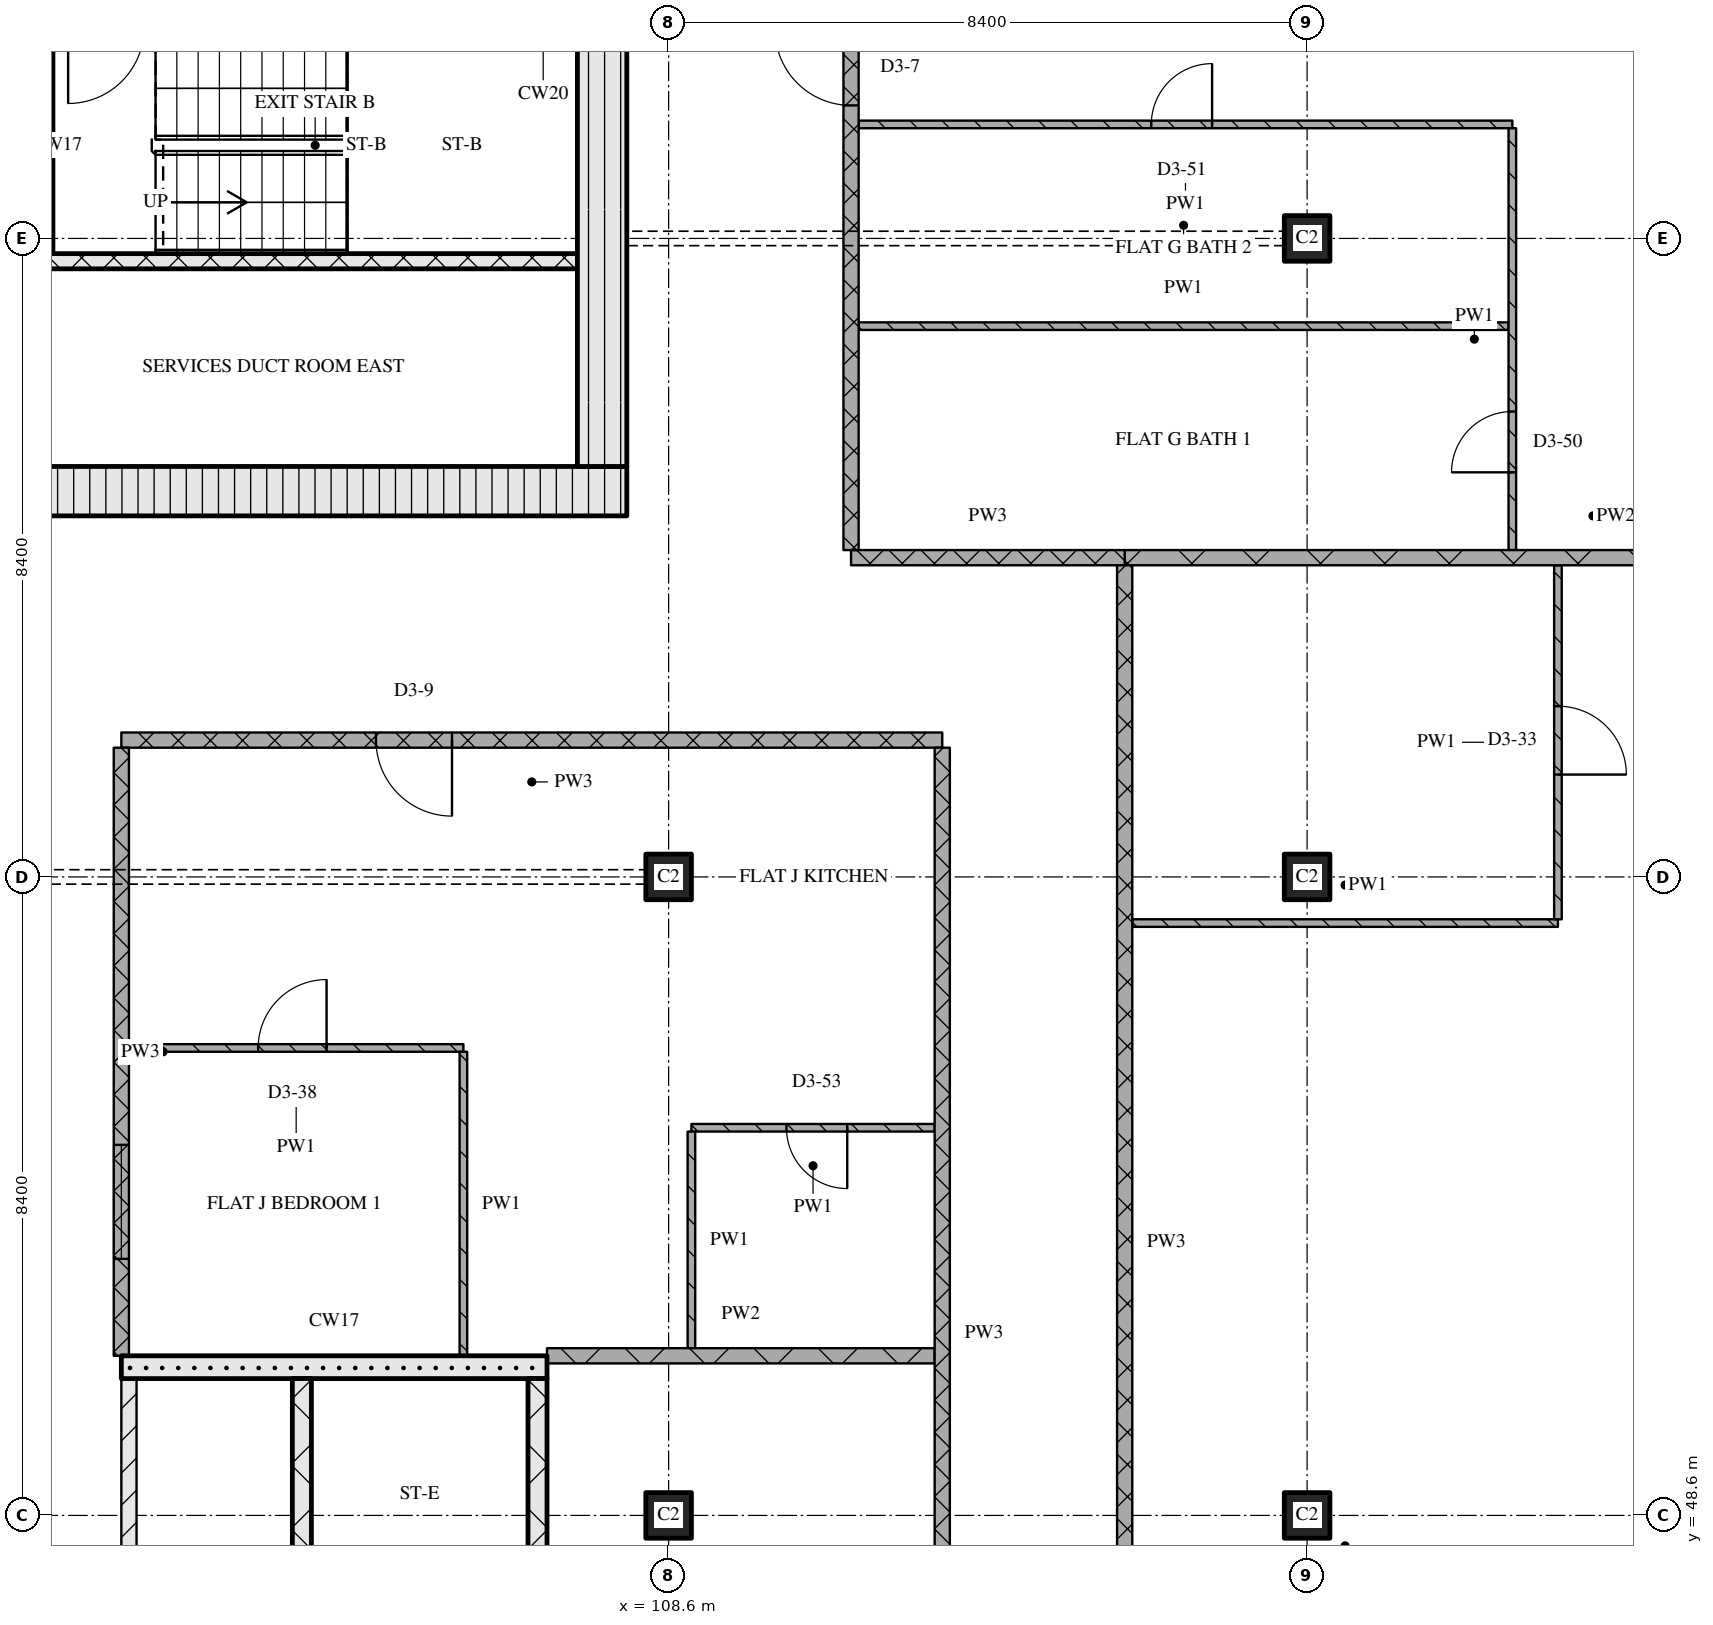
"""IFC4 building model, lengths in metres.
Left out: names, types, materials, properties, quantities, classifications, styles, units other than length and angle.
Written with IfcOpenShell. Run it as: python <this file> out.ifc"""

import sys

from ifc_helpers import new_model, si_unit, direction, frame, frame_2d, origin, origin_2d, place, context, subcontext, project, spatial, rectangle, extrude, element, fill, save


model = new_model("IFC4")
c1 = context("Model", 3, precision=1e-05, world=origin(), true_north=direction((0.0, 1.0)))
c2 = subcontext(c1, "Body", "Model", "MODEL_VIEW")
j1 = project(units=[si_unit("LENGTHUNIT", "METRE"), si_unit("PLANEANGLEUNIT", "RADIAN")], contexts=[c1])
p1 = place(None, origin())
s1 = spatial("IfcSite", under=j1, at=p1, CompositionType="ELEMENT")
p2 = place(p1, origin())
s2 = spatial("IfcBuilding", under=s1, at=p2, CompositionType="ELEMENT")
p3 = place(p2, frame((0.0, 0.0, 234.3)))
s3 = spatial("IfcBuildingStorey", under=s2, at=p3, CompositionType="ELEMENT", Elevation=234.3)
for number, where, z_axis, x_axis in (
    (1, (108.6, 48.6, 0.0), (0.0, 0.0, 1.0), (1.0, 0.0, 0.0)),
    (2, (108.6, 57.0, 0.0), (0.0, 0.0, 1.0), (1.0, 0.0, 0.0)),
    (3, (117.0, 48.6, 0.0), (0.0, 0.0, 1.0), (1.0, 0.0, 0.0)),
    (4, (117.0, 57.0, 0.0), (0.0, 0.0, 1.0), (1.0, 0.0, 0.0)),
    (5, (117.0, 65.4, 0.0), (0.0, 0.0, 1.0), (1.0, 0.0, 0.0)),
):
    element("IfcColumn", number, at=place(p3, frame(where, z_axis=z_axis, x_axis=x_axis)), inside=s3, PredefinedType="COLUMN", context=c2, shape_type="SweptSolid", body=[
        extrude(rectangle(XDim=0.6, YDim=0.6, at=origin_2d()), origin(), (0.0, 0.0, 1.0), 3.6),
    ])
p4 = place(p3, frame((67.15, 62.075, 0.0), z_axis=(0.0, 0.0, 1.0), x_axis=(1.0, 0.0, 0.0)))
e6 = element("IfcWall", 6, at=p4, inside=s3, PredefinedType="SOLIDWALL", context=c2, shape_type="SweptSolid", body=[
    extrude(rectangle(XDim=40.9, YDim=0.65, at=frame_2d((20.45, 0.0))), origin(), (0.0, 0.0, 1.0), 3.32),
])
p5 = place(p4, frame((20.8, 0.0, 0.0)))
e7 = element("IfcOpeningElement", 7, at=p5, cuts=e6, PredefinedType="OPENING", context=c2, shape_type="SweptSolid", body=[
    extrude(rectangle(XDim=1.8, YDim=2.1, at=frame_2d((0.9, 1.05))), frame((0.0, 0.335, 0.0), z_axis=(0.0, -1.0, 0.0), x_axis=(1.0, 0.0, 0.0)), (0.0, 0.0, 1.0), 0.67),
])
p6 = place(p3, frame((107.725, 62.4, 0.0), z_axis=(0.0, 0.0, 1.0), x_axis=(0.0, 1.0, 0.0)))
e8 = element("IfcWall", 8, at=p6, inside=s3, PredefinedType="SOLIDWALL", context=c2, shape_type="SweptSolid", body=[
    extrude(rectangle(XDim=12.0, YDim=0.65, at=frame_2d((6.0, 0.0))), origin(), (0.0, 0.0, 1.0), 3.32),
])
p7 = place(p6, frame((6.45, 0.0, 0.0)))
e9 = element("IfcOpeningElement", 9, at=p7, cuts=e8, PredefinedType="OPENING", context=c2, shape_type="SweptSolid", body=[
    extrude(rectangle(XDim=1.2, YDim=2.1, at=frame_2d((0.6, 1.05))), frame((0.0, 0.335, 0.0), z_axis=(0.0, -1.0, 0.0), x_axis=(1.0, 0.0, 0.0)), (0.0, 0.0, 1.0), 0.67),
])
p8 = place(p3, frame((91.4, 65.1, 0.0), z_axis=(0.0, 0.0, 1.0), x_axis=(1.0, 0.0, 0.0)))
e10 = element("IfcWall", 10, at=p8, inside=s3, PredefinedType="SOLIDWALL", context=c2, shape_type="SweptSolid", body=[
    extrude(rectangle(XDim=16.0, YDim=0.2, at=frame_2d((8.0, 0.0))), origin(), (0.0, 0.0, 1.0), 3.32),
])
p9 = place(p8, frame((0.85, 0.0, 0.0)))
e11 = element("IfcOpeningElement", 11, at=p9, cuts=e10, PredefinedType="OPENING", context=c2, shape_type="SweptSolid", body=[
    extrude(rectangle(XDim=1.1, YDim=2.1, at=frame_2d((0.55, 1.05))), frame((0.0, 0.11, 0.0), z_axis=(0.0, -1.0, 0.0), x_axis=(1.0, 0.0, 0.0)), (0.0, 0.0, 1.0), 0.22),
])
p10 = place(p8, frame((3.35, 0.0, 0.0)))
e12 = element("IfcOpeningElement", 12, at=p10, cuts=e10, PredefinedType="OPENING", context=c2, shape_type="SweptSolid", body=[
    extrude(rectangle(XDim=1.1, YDim=2.1, at=frame_2d((0.55, 1.05))), frame((0.0, 0.11, 0.0), z_axis=(0.0, -1.0, 0.0), x_axis=(1.0, 0.0, 0.0)), (0.0, 0.0, 1.0), 0.22),
])
p11 = place(p8, frame((5.85, 0.0, 0.0)))
e13 = element("IfcOpeningElement", 13, at=p11, cuts=e10, PredefinedType="OPENING", context=c2, shape_type="SweptSolid", body=[
    extrude(rectangle(XDim=1.1, YDim=2.1, at=frame_2d((0.55, 1.05))), frame((0.0, 0.11, 0.0), z_axis=(0.0, -1.0, 0.0), x_axis=(1.0, 0.0, 0.0)), (0.0, 0.0, 1.0), 0.22),
])
p12 = place(p8, frame((7.83, 0.0, 0.0)))
e14 = element("IfcOpeningElement", 14, at=p12, cuts=e10, PredefinedType="OPENING", context=c2, shape_type="SweptSolid", body=[
    extrude(rectangle(XDim=0.9, YDim=2.1, at=frame_2d((0.45, 1.05))), frame((0.0, 0.11, 0.0), z_axis=(0.0, -1.0, 0.0), x_axis=(1.0, 0.0, 0.0)), (0.0, 0.0, 1.0), 0.22),
])
p13 = place(p3, frame((100.35, 65.2, 0.0), z_axis=(0.0, 0.0, 1.0), x_axis=(0.0, 1.0, 0.0)))
e15 = element("IfcWall", 15, at=p13, inside=s3, PredefinedType="SOLIDWALL", context=c2, shape_type="SweptSolid", body=[
    extrude(rectangle(XDim=2.85, YDim=0.3, at=frame_2d((1.425, 0.0))), origin(), (0.0, 0.0, 1.0), 3.32),
])
p14 = place(p3, frame((101.5, 43.5, 0.0), z_axis=(0.0, 0.0, 1.0), x_axis=(0.0, 1.0, 0.0)))
e16 = element("IfcWall", 16, at=p14, inside=s3, PredefinedType="PARTITIONING", context=c2, shape_type="SweptSolid", body=[
    extrude(rectangle(XDim=6.9, YDim=0.2, at=frame_2d((3.45, 0.0))), origin(), (0.0, 0.0, 1.0), 3.32),
])
p15 = place(p14, frame((1.0, 0.0, 0.0)))
e17 = element("IfcOpeningElement", 17, at=p15, cuts=e16, PredefinedType="OPENING", context=c2, shape_type="SweptSolid", body=[
    extrude(rectangle(XDim=1.0, YDim=2.1, at=frame_2d((0.5, 1.05))), frame((0.0, 0.11, 0.0), z_axis=(0.0, -1.0, 0.0), x_axis=(1.0, 0.0, 0.0)), (0.0, 0.0, 1.0), 0.22),
])
p16 = place(p3, frame((103.775, 43.5, 0.0), z_axis=(0.0, 0.0, 1.0), x_axis=(0.0, 1.0, 0.0)))
e18 = element("IfcWall", 18, at=p16, inside=s3, PredefinedType="SOLIDWALL", context=c2, shape_type="SweptSolid", body=[
    extrude(rectangle(XDim=6.9, YDim=0.25, at=frame_2d((3.45, 0.0))), origin(), (0.0, 0.0, 1.0), 3.32),
])
p17 = place(p16, frame((0.2, 0.0, 0.0)))
e19 = element("IfcOpeningElement", 19, at=p17, cuts=e18, PredefinedType="OPENING", context=c2, shape_type="SweptSolid", body=[
    extrude(rectangle(XDim=1.0, YDim=2.1, at=frame_2d((0.5, 1.05))), frame((0.0, 0.135, 0.0), z_axis=(0.0, -1.0, 0.0), x_axis=(1.0, 0.0, 0.0)), (0.0, 0.0, 1.0), 0.27),
])
p18 = place(p3, frame((106.875, 43.5, 0.0), z_axis=(0.0, 0.0, 1.0), x_axis=(0.0, 1.0, 0.0)))
e20 = element("IfcWall", 20, at=p18, inside=s3, PredefinedType="SOLIDWALL", context=c2, shape_type="SweptSolid", body=[
    extrude(rectangle(XDim=6.9, YDim=0.25, at=frame_2d((3.45, 0.0))), origin(), (0.0, 0.0, 1.0), 3.32),
])
p19 = place(p3, frame((101.4, 50.55, 0.0), z_axis=(0.0, 0.0, 1.0), x_axis=(1.0, 0.0, 0.0)))
e21 = element("IfcWall", 21, at=p19, inside=s3, PredefinedType="SOLIDWALL", context=c2, shape_type="SweptSolid", body=[
    extrude(rectangle(XDim=5.6, YDim=0.3, at=frame_2d((2.8, 0.0))), origin(), (0.0, 0.0, 1.0), 3.32),
])
p20 = place(p3, frame((107.0, 50.7, 0.0), z_axis=(0.0, 0.0, 1.0), x_axis=(1.0, 0.0, 0.0)))
e22 = element("IfcWall", 22, at=p20, inside=s3, PredefinedType="PARTITIONING", context=c2, shape_type="SweptSolid", body=[
    extrude(rectangle(XDim=5.1, YDim=0.2, at=frame_2d((2.55, 0.0))), origin(), (0.0, 0.0, 1.0), 3.32),
])
p21 = place(p3, frame((112.1, 53.7, 0.0), z_axis=(0.0, 0.0, 1.0), x_axis=(-1.0, 0.0, 0.0)))
e23 = element("IfcWall", 23, at=p21, inside=s3, PredefinedType="PARTITIONING", context=c2, shape_type="SweptSolid", body=[
    extrude(rectangle(XDim=3.2, YDim=0.1, at=frame_2d((1.6, 0.0))), origin(), (0.0, 0.0, 1.0), 3.32),
])
p22 = place(p21, frame((1.15, 0.0, 0.0)))
e24 = element("IfcOpeningElement", 24, at=p22, cuts=e23, PredefinedType="OPENING", context=c2, shape_type="SweptSolid", body=[
    extrude(rectangle(XDim=0.8, YDim=2.1, at=frame_2d((0.4, 1.05))), frame((0.0, 0.06, 0.0), z_axis=(0.0, -1.0, 0.0), x_axis=(1.0, 0.0, 0.0)), (0.0, 0.0, 1.0), 0.12),
])
p23 = place(p3, frame((105.9, 54.75, 0.0), z_axis=(0.0, 0.0, 1.0), x_axis=(-1.0, 0.0, 0.0)))
e25 = element("IfcWall", 25, at=p23, inside=s3, PredefinedType="PARTITIONING", context=c2, shape_type="SweptSolid", body=[
    extrude(rectangle(XDim=4.4, YDim=0.1, at=frame_2d((2.2, 0.0))), origin(), (0.0, 0.0, 1.0), 3.32),
])
p24 = place(p23, frame((1.8, 0.0, 0.0)))
e26 = element("IfcOpeningElement", 26, at=p24, cuts=e25, PredefinedType="OPENING", context=c2, shape_type="SweptSolid", body=[
    extrude(rectangle(XDim=0.9, YDim=2.1, at=frame_2d((0.45, 1.05))), frame((0.0, 0.06, 0.0), z_axis=(0.0, -1.0, 0.0), x_axis=(1.0, 0.0, 0.0)), (0.0, 0.0, 1.0), 0.12),
])
p25 = place(p3, frame((114.7, 56.393, 0.0), z_axis=(0.0, 0.0, 1.0), x_axis=(1.0, 0.0, 0.0)))
e27 = element("IfcWall", 27, at=p25, inside=s3, PredefinedType="PARTITIONING", context=c2, shape_type="SweptSolid", body=[
    extrude(rectangle(XDim=5.6, YDim=0.1, at=frame_2d((2.8, 0.0))), origin(), (0.0, 0.0, 1.0), 3.32),
])
p26 = place(p3, frame((112.2, 58.8, 0.0), z_axis=(0.0, 0.0, 1.0), x_axis=(-1.0, 0.0, 0.0)))
e28 = element("IfcWall", 28, at=p26, inside=s3, PredefinedType="PARTITIONING", context=c2, shape_type="SweptSolid", body=[
    extrude(rectangle(XDim=10.8, YDim=0.2, at=frame_2d((5.4, 0.0))), origin(), (0.0, 0.0, 1.0), 3.32),
])
p27 = place(p26, frame((6.45, 0.0, 0.0)))
e29 = element("IfcOpeningElement", 29, at=p27, cuts=e28, PredefinedType="OPENING", context=c2, shape_type="SweptSolid", body=[
    extrude(rectangle(XDim=1.0, YDim=2.1, at=frame_2d((0.5, 1.05))), frame((0.0, 0.11, 0.0), z_axis=(0.0, -1.0, 0.0), x_axis=(1.0, 0.0, 0.0)), (0.0, 0.0, 1.0), 0.22),
])
p28 = place(p3, frame((111.0, 61.2, 0.0), z_axis=(0.0, 0.0, 1.0), x_axis=(1.0, 0.0, 0.0)))
e30 = element("IfcWall", 30, at=p28, inside=s3, PredefinedType="PARTITIONING", context=c2, shape_type="SweptSolid", body=[
    extrude(rectangle(XDim=3.6, YDim=0.2, at=frame_2d((1.8, 0.0))), origin(), (0.0, 0.0, 1.0), 3.32),
])
p29 = place(p3, frame((114.6, 61.2, 0.0), z_axis=(0.0, 0.0, 1.0), x_axis=(1.0, 0.0, 0.0)))
e31 = element("IfcWall", 31, at=p29, inside=s3, PredefinedType="PARTITIONING", context=c2, shape_type="SweptSolid", body=[
    extrude(rectangle(XDim=12.32, YDim=0.2, at=frame_2d((6.16, 0.0))), origin(), (0.0, 0.0, 1.0), 3.32),
])
p30 = place(p3, frame((111.1, 64.246, 0.0), z_axis=(0.0, 0.0, 1.0), x_axis=(1.0, 0.0, 0.0)))
e32 = element("IfcWall", 32, at=p30, inside=s3, PredefinedType="PARTITIONING", context=c2, shape_type="SweptSolid", body=[
    extrude(rectangle(XDim=8.55, YDim=0.1, at=frame_2d((4.275, 0.0))), origin(), (0.0, 0.0, 1.0), 3.32),
])
p31 = place(p3, frame((119.7, 66.9, 0.0), z_axis=(0.0, 0.0, 1.0), x_axis=(-1.0, 0.0, 0.0)))
e33 = element("IfcWall", 33, at=p31, inside=s3, PredefinedType="PARTITIONING", context=c2, shape_type="SweptSolid", body=[
    extrude(rectangle(XDim=8.6, YDim=0.1, at=frame_2d((4.3, 0.0))), origin(), (0.0, 0.0, 1.0), 3.32),
])
p32 = place(p31, frame((3.95, 0.0, 0.0)))
e34 = element("IfcOpeningElement", 34, at=p32, cuts=e33, PredefinedType="OPENING", context=c2, shape_type="SweptSolid", body=[
    extrude(rectangle(XDim=0.8, YDim=2.1, at=frame_2d((0.4, 1.05))), frame((0.0, 0.06, 0.0), z_axis=(0.0, -1.0, 0.0), x_axis=(1.0, 0.0, 0.0)), (0.0, 0.0, 1.0), 0.12),
])
p33 = place(p3, frame((101.4, 58.7, 0.0), z_axis=(0.0, 0.0, 1.0), x_axis=(0.0, -1.0, 0.0)))
e35 = element("IfcWall", 35, at=p33, inside=s3, PredefinedType="PARTITIONING", context=c2, shape_type="SweptSolid", body=[
    extrude(rectangle(XDim=8.0, YDim=0.2, at=frame_2d((4.0, 0.0))), origin(), (0.0, 0.0, 1.0), 3.32),
])
p34 = place(p33, frame((5.225, 0.0, 0.9)))
e36 = element("IfcOpeningElement", 36, at=p34, cuts=e35, PredefinedType="OPENING", context=c2, shape_type="SweptSolid", body=[
    extrude(rectangle(XDim=1.5, YDim=1.5, at=frame_2d((0.75, 0.75))), frame((0.0, 0.11, 0.0), z_axis=(0.0, -1.0, 0.0), x_axis=(1.0, 0.0, 0.0)), (0.0, 0.0, 1.0), 0.22),
])
p35 = place(p3, frame((105.9, 54.7, 0.0), z_axis=(0.0, 0.0, 1.0), x_axis=(0.0, -1.0, 0.0)))
e37 = element("IfcWall", 37, at=p35, inside=s3, PredefinedType="PARTITIONING", context=c2, shape_type="SweptSolid", body=[
    extrude(rectangle(XDim=4.0, YDim=0.1, at=frame_2d((2.0, 0.0))), origin(), (0.0, 0.0, 1.0), 3.32),
])
p36 = place(p3, frame((108.9, 53.65, 0.0), z_axis=(0.0, 0.0, 1.0), x_axis=(0.0, -1.0, 0.0)))
e38 = element("IfcWall", 38, at=p36, inside=s3, PredefinedType="PARTITIONING", context=c2, shape_type="SweptSolid", body=[
    extrude(rectangle(XDim=2.85, YDim=0.1, at=frame_2d((1.425, 0.0))), origin(), (0.0, 0.0, 1.0), 3.32),
])
p37 = place(p3, frame((111.0, 75.32, 0.0), z_axis=(0.0, 0.0, 1.0), x_axis=(0.0, -1.0, 0.0)))
e39 = element("IfcWall", 39, at=p37, inside=s3, PredefinedType="PARTITIONING", context=c2, shape_type="SweptSolid", body=[
    extrude(rectangle(XDim=14.02, YDim=0.2, at=frame_2d((7.01, 0.0))), origin(), (0.0, 0.0, 1.0), 3.32),
])
p38 = place(p37, frame((7.17, 0.0, 0.0)))
e40 = element("IfcOpeningElement", 40, at=p38, cuts=e39, PredefinedType="OPENING", context=c2, shape_type="SweptSolid", body=[
    extrude(rectangle(XDim=1.0, YDim=2.1, at=frame_2d((0.5, 1.05))), frame((0.0, 0.11, 0.0), z_axis=(0.0, -1.0, 0.0), x_axis=(1.0, 0.0, 0.0)), (0.0, 0.0, 1.0), 0.22),
])
p39 = place(p3, frame((112.2, 58.7, 0.0), z_axis=(0.0, 0.0, 1.0), x_axis=(0.0, -1.0, 0.0)))
e41 = element("IfcWall", 41, at=p39, inside=s3, PredefinedType="PARTITIONING", context=c2, shape_type="SweptSolid", body=[
    extrude(rectangle(XDim=15.4, YDim=0.2, at=frame_2d((7.7, 0.0))), origin(), (0.0, 0.0, 1.0), 3.32),
])
p40 = place(p3, frame((114.6, 61.1, 0.0), z_axis=(0.0, 0.0, 1.0), x_axis=(0.0, -1.0, 0.0)))
e42 = element("IfcWall", 42, at=p40, inside=s3, PredefinedType="PARTITIONING", context=c2, shape_type="SweptSolid", body=[
    extrude(rectangle(XDim=17.8, YDim=0.2, at=frame_2d((8.9, 0.0))), origin(), (0.0, 0.0, 1.0), 3.32),
])
p41 = place(p3, frame((119.7, 61.3, 0.0), z_axis=(0.0, 0.0, 1.0), x_axis=(0.0, 1.0, 0.0)))
e43 = element("IfcWall", 43, at=p41, inside=s3, PredefinedType="PARTITIONING", context=c2, shape_type="SweptSolid", body=[
    extrude(rectangle(XDim=5.55, YDim=0.1, at=frame_2d((2.775, 0.0))), origin(), (0.0, 0.0, 1.0), 3.32),
])
p42 = place(p41, frame((1.023, 0.0, 0.0)))
e44 = element("IfcOpeningElement", 44, at=p42, cuts=e43, PredefinedType="OPENING", context=c2, shape_type="SweptSolid", body=[
    extrude(rectangle(XDim=0.8, YDim=2.1, at=frame_2d((0.4, 1.05))), frame((0.0, 0.06, 0.0), z_axis=(0.0, -1.0, 0.0), x_axis=(1.0, 0.0, 0.0)), (0.0, 0.0, 1.0), 0.12),
])
p43 = place(p3, frame((120.3, 56.443, 0.0), z_axis=(0.0, 0.0, 1.0), x_axis=(0.0, 1.0, 0.0)))
e45 = element("IfcWall", 45, at=p43, inside=s3, PredefinedType="PARTITIONING", context=c2, shape_type="SweptSolid", body=[
    extrude(rectangle(XDim=4.657, YDim=0.1, at=frame_2d((2.329, 0.0))), origin(), (0.0, 0.0, 1.0), 3.32),
])
p44 = place(p43, frame((1.904, 0.0, 0.0)))
e46 = element("IfcOpeningElement", 46, at=p44, cuts=e45, PredefinedType="OPENING", context=c2, shape_type="SweptSolid", body=[
    extrude(rectangle(XDim=0.9, YDim=2.1, at=frame_2d((0.45, 1.05))), frame((0.0, 0.06, 0.0), z_axis=(0.0, -1.0, 0.0), x_axis=(1.0, 0.0, 0.0)), (0.0, 0.0, 1.0), 0.12),
])
p45 = place(p22, origin())
e47 = element("IfcDoor", 47, at=p45, inside=s3, OperationType="SINGLE_SWING_LEFT", PredefinedType="DOOR", context=c2, shape_type="SweptSolid", body=[
    extrude(rectangle(XDim=0.8, YDim=2.1, at=frame_2d((0.4, 1.05))), frame((0.0, 0.025, 0.0), z_axis=(0.0, -1.0, 0.0), x_axis=(1.0, 0.0, 0.0)), (0.0, 0.0, 1.0), 0.05),
])
fill(e24, e47)
p46 = place(p24, origin())
e48 = element("IfcDoor", 48, at=p46, inside=s3, OperationType="SINGLE_SWING_RIGHT", PredefinedType="DOOR", context=c2, shape_type="SweptSolid", body=[
    extrude(rectangle(XDim=0.9, YDim=2.1, at=frame_2d((0.45, 1.05))), frame((0.0, 0.025, 0.0), z_axis=(0.0, -1.0, 0.0), x_axis=(1.0, 0.0, 0.0)), (0.0, 0.0, 1.0), 0.05),
])
fill(e26, e48)
p47 = place(p27, origin())
e49 = element("IfcDoor", 49, at=p47, inside=s3, OperationType="SINGLE_SWING_LEFT", PredefinedType="DOOR", context=c2, shape_type="SweptSolid", body=[
    extrude(rectangle(XDim=1.0, YDim=2.1, at=frame_2d((0.5, 1.05))), frame((0.0, 0.025, 0.0), z_axis=(0.0, -1.0, 0.0), x_axis=(1.0, 0.0, 0.0)), (0.0, 0.0, 1.0), 0.05),
])
fill(e29, e49)
p48 = place(p32, origin())
e50 = element("IfcDoor", 50, at=p48, inside=s3, OperationType="SINGLE_SWING_RIGHT", PredefinedType="DOOR", context=c2, shape_type="SweptSolid", body=[
    extrude(rectangle(XDim=0.8, YDim=2.1, at=frame_2d((0.4, 1.05))), frame((0.0, 0.025, 0.0), z_axis=(0.0, -1.0, 0.0), x_axis=(1.0, 0.0, 0.0)), (0.0, 0.0, 1.0), 0.05),
])
fill(e34, e50)
p49 = place(p38, origin())
e51 = element("IfcDoor", 51, at=p49, inside=s3, OperationType="SINGLE_SWING_RIGHT", PredefinedType="DOOR", context=c2, shape_type="SweptSolid", body=[
    extrude(rectangle(XDim=1.0, YDim=2.1, at=frame_2d((0.5, 1.05))), frame((0.0, 0.025, 0.0), z_axis=(0.0, -1.0, 0.0), x_axis=(1.0, 0.0, 0.0)), (0.0, 0.0, 1.0), 0.05),
])
fill(e40, e51)
p50 = place(p42, origin())
e52 = element("IfcDoor", 52, at=p50, inside=s3, OperationType="SINGLE_SWING_LEFT", PredefinedType="DOOR", context=c2, shape_type="SweptSolid", body=[
    extrude(rectangle(XDim=0.8, YDim=2.1, at=frame_2d((0.4, 1.05))), frame((0.0, 0.025, 0.0), z_axis=(0.0, -1.0, 0.0), x_axis=(1.0, 0.0, 0.0)), (0.0, 0.0, 1.0), 0.05),
])
fill(e44, e52)
p51 = place(p44, origin())
e53 = element("IfcDoor", 53, at=p51, inside=s3, OperationType="SINGLE_SWING_RIGHT", PredefinedType="DOOR", context=c2, shape_type="SweptSolid", body=[
    extrude(rectangle(XDim=0.9, YDim=2.1, at=frame_2d((0.45, 1.05))), frame((0.0, 0.025, 0.0), z_axis=(0.0, -1.0, 0.0), x_axis=(1.0, 0.0, 0.0)), (0.0, 0.0, 1.0), 0.05),
])
fill(e46, e53)
p52 = place(p34, origin())
e54 = element("IfcWindow", 54, at=p52, inside=s3, PartitioningType="SINGLE_PANEL", PredefinedType="WINDOW", context=c2, shape_type="SweptSolid", body=[
    extrude(rectangle(XDim=1.5, YDim=1.5, at=frame_2d((0.75, 0.75))), frame((0.0, 0.03, 0.0), z_axis=(0.0, -1.0, 0.0), x_axis=(1.0, 0.0, 0.0)), (0.0, 0.0, 1.0), 0.06),
])
fill(e36, e54)
save(model, sys.argv[1])
